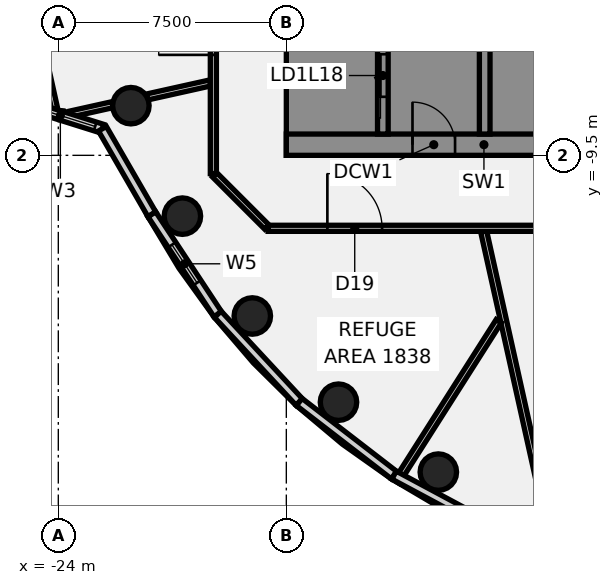
"""IFC4 building model, lengths in metres.
Left out: names, types, materials, properties, quantities, classifications, styles, units other than length and angle.
Written with IfcOpenShell. Run it as: python <this file> out.ifc"""

import sys

from ifc_helpers import new_model, si_unit, direction, frame, frame_2d, origin, origin_2d, place, context, subcontext, project, spatial, polyline, rectangle, circle, outline, extrude, element, fill, save


model = new_model("IFC4")
c1 = context("Model", 3, precision=1e-05, world=origin(), true_north=direction((0.0, 1.0)))
c2 = subcontext(c1, "Body", "Model", "MODEL_VIEW")
j1 = project(units=[si_unit("LENGTHUNIT", "METRE"), si_unit("PLANEANGLEUNIT", "RADIAN")], contexts=[c1])
p1 = place(None, origin())
s1 = spatial("IfcSite", under=j1, at=p1, CompositionType="ELEMENT")
p2 = place(p1, origin())
s2 = spatial("IfcBuilding", under=s1, at=p2, CompositionType="ELEMENT")
p3 = place(p2, frame((0.0, 0.0, 79.0)))
s3 = spatial("IfcBuildingStorey", under=s2, at=p3, CompositionType="ELEMENT", Elevation=79.0)
for number, where, z_axis, x_axis in (
    (1, (-21.613, -7.866, -0.18), (0.0, 0.0, 1.0), (1.0, 0.0, 0.0)),
    (2, (-19.919, -11.5, -0.18), (0.0, 0.0, 1.0), (1.0, 0.0, 0.0)),
    (3, (-17.619, -14.784, -0.18), (0.0, 0.0, 1.0), (1.0, 0.0, 0.0)),
    (4, (-14.784, -17.619, -0.18), (0.0, 0.0, 1.0), (1.0, 0.0, 0.0)),
    (5, (-11.5, -19.919, -0.18), (0.0, 0.0, 1.0), (1.0, 0.0, 0.0)),
):
    element("IfcColumn", number, at=place(p3, frame(where, z_axis=z_axis, x_axis=x_axis)), inside=s3, PredefinedType="COLUMN", context=c2, shape_type="SweptSolid", body=[
        extrude(circle(Radius=0.6, at=origin_2d()), origin(), (0.0, 0.0, 1.0), 4.54),
    ])
p4 = place(p3, frame((-27.164, 5.714, 0.0), z_axis=(0.0, 0.0, 1.0), x_axis=(0.217081624554, -0.976153455293, 0.0)))
e6 = element("IfcWall", 6, at=p4, inside=s3, PredefinedType="PARTITIONING", context=c2, shape_type="SweptSolid", body=[
    extrude(rectangle(XDim=14.022, YDim=0.2, at=frame_2d((7.011, 0.0))), origin(), (0.0, 0.0, 1.0), 3.66),
])
p5 = place(p4, frame((6.099, 0.0, 0.0)))
e7 = element("IfcOpeningElement", 7, at=p5, cuts=e6, PredefinedType="OPENING", context=c2, shape_type="SweptSolid", body=[
    extrude(rectangle(XDim=1.4, YDim=2.1, at=frame_2d((0.7, 1.05))), frame((0.0, 0.11, 0.0), z_axis=(0.0, -1.0, 0.0), x_axis=(1.0, 0.0, 0.0)), (0.0, 0.0, 1.0), 0.22),
])
p6 = place(p3, frame((-10.009, -12.002, 0.0), z_axis=(0.0, 0.0, 1.0), x_axis=(0.217240415782, -0.976118128994, 0.0)))
e8 = element("IfcWall", 8, at=p6, inside=s3, PredefinedType="PARTITIONING", context=c2, shape_type="SweptSolid", body=[
    extrude(rectangle(XDim=9.257, YDim=0.2, at=frame_2d((4.628, 0.0))), origin(), (0.0, 0.0, 1.0), 3.66),
])
p7 = place(p3, frame((-18.858, -10.142, 0.0), z_axis=(0.0, 0.0, 1.0), x_axis=(0.707106781187, -0.707106781187, 0.0)))
e9 = element("IfcWall", 9, at=p7, inside=s3, PredefinedType="PARTITIONING", context=c2, shape_type="SweptSolid", body=[
    extrude(rectangle(XDim=2.426, YDim=0.2, at=frame_2d((1.213, 0.0))), origin(), (0.0, 0.0, 1.0), 3.66),
])
p8 = place(p3, frame((-17.1, -11.9, 0.0), z_axis=(0.0, 0.0, 1.0), x_axis=(1.0, 0.0, 0.0)))
e10 = element("IfcWall", 10, at=p8, inside=s3, PredefinedType="PARTITIONING", context=c2, shape_type="SweptSolid", body=[
    extrude(rectangle(XDim=34.145, YDim=0.2, at=frame_2d((17.073, 0.0))), origin(), (0.0, 0.0, 1.0), 3.66),
])
p9 = place(p8, frame((13.921, 0.0, 0.0)))
e11 = element("IfcOpeningElement", 11, at=p9, cuts=e10, PredefinedType="OPENING", context=c2, shape_type="SweptSolid", body=[
    extrude(rectangle(XDim=1.8, YDim=2.1, at=frame_2d((0.9, 1.05))), frame((0.0, 0.11, 0.0), z_axis=(0.0, -1.0, 0.0), x_axis=(1.0, 0.0, 0.0)), (0.0, 0.0, 1.0), 0.22),
])
p10 = place(p8, frame((1.95, 0.0, 0.0)))
e12 = element("IfcOpeningElement", 12, at=p10, cuts=e10, PredefinedType="OPENING", context=c2, shape_type="SweptSolid", body=[
    extrude(rectangle(XDim=1.8, YDim=2.1, at=frame_2d((0.9, 1.05))), frame((0.0, 0.11, 0.0), z_axis=(0.0, -1.0, 0.0), x_axis=(1.0, 0.0, 0.0)), (0.0, 0.0, 1.0), 0.22),
])
p11 = place(p8, frame((27.44, 0.0, 0.0)))
e13 = element("IfcOpeningElement", 13, at=p11, cuts=e10, PredefinedType="OPENING", context=c2, shape_type="SweptSolid", body=[
    extrude(rectangle(XDim=1.8, YDim=2.1, at=frame_2d((0.9, 1.05))), frame((0.0, 0.11, 0.0), z_axis=(0.0, -1.0, 0.0), x_axis=(1.0, 0.0, 0.0)), (0.0, 0.0, 1.0), 0.22),
])
p12 = place(p3, frame((-23.592, -8.14, 0.0), z_axis=(0.0, 0.0, 1.0), x_axis=(0.976142259417, 0.217131963057, 0.0)))
e14 = element("IfcWall", 14, at=p12, inside=s3, PredefinedType="PARTITIONING", context=c2, shape_type="SweptSolid", body=[
    extrude(rectangle(XDim=1.411, YDim=0.2, at=frame_2d((0.706, 0.0))), origin(), (0.0, 0.0, 1.0), 3.66),
])
p13 = place(p3, frame((-21.08, -7.581, 0.0), z_axis=(0.0, 0.0, 1.0), x_axis=(0.97615465389, 0.217076234739, 0.0)))
e15 = element("IfcWall", 15, at=p13, inside=s3, PredefinedType="PARTITIONING", context=c2, shape_type="SweptSolid", body=[
    extrude(rectangle(XDim=2.128, YDim=0.2, at=frame_2d((1.064, 0.0))), origin(), (0.0, 0.0, 1.0), 3.66),
])
p14 = place(p3, frame((-12.872, -20.233, 0.0), z_axis=(0.0, 0.0, 1.0), x_axis=(0.536749284021, 0.843741788762, 0.0)))
e16 = element("IfcWall", 16, at=p14, inside=s3, PredefinedType="PARTITIONING", context=c2, shape_type="SweptSolid", body=[
    extrude(rectangle(XDim=6.259, YDim=0.2, at=frame_2d((3.129, 0.0))), origin(), (0.0, 0.0, 1.0), 3.66),
])
p15 = place(p3, frame((-18.9, -10.1, 0.0), z_axis=(0.0, 0.0, 1.0), x_axis=(0.0, 1.0, 0.0)))
e17 = element("IfcWall", 17, at=p15, inside=s3, PredefinedType="PARTITIONING", context=c2, shape_type="SweptSolid", body=[
    extrude(rectangle(XDim=20.2, YDim=0.2, at=frame_2d((10.1, 0.0))), origin(), (0.0, 0.0, 1.0), 3.66),
])
p16 = place(p15, frame((10.606, 0.0, 0.0)))
e18 = element("IfcOpeningElement", 18, at=p16, cuts=e17, PredefinedType="OPENING", context=c2, shape_type="SweptSolid", body=[
    extrude(rectangle(XDim=1.8, YDim=2.1, at=frame_2d((0.9, 1.05))), frame((0.0, 0.11, 0.0), z_axis=(0.0, -1.0, 0.0), x_axis=(1.0, 0.0, 0.0)), (0.0, 0.0, 1.0), 0.22),
])
p17 = place(p15, frame((3.904, 0.0, 0.0)))
e19 = element("IfcOpeningElement", 19, at=p17, cuts=e17, PredefinedType="OPENING", context=c2, shape_type="SweptSolid", body=[
    extrude(rectangle(XDim=1.8, YDim=2.1, at=frame_2d((0.9, 1.05))), frame((0.0, 0.11, 0.0), z_axis=(0.0, -1.0, 0.0), x_axis=(1.0, 0.0, 0.0)), (0.0, 0.0, 1.0), 0.22),
])
p18 = place(p3, frame((-25.268, -7.771, 0.0), z_axis=(0.0, 0.0, 1.0), x_axis=(0.954072095572, -0.299577096006, 0.0)))
e20 = element("IfcWall", 20, at=p18, inside=s3, PredefinedType="SOLIDWALL", context=c2, shape_type="SweptSolid", body=[
    extrude(rectangle(XDim=2.85, YDim=0.3, at=frame_2d((1.425, 0.0))), origin(), (0.0, 0.0, 1.0), 4.36),
])
p19 = place(p18, frame((0.2, 0.0, 1.4)))
e21 = element("IfcOpeningElement", 21, at=p19, cuts=e20, PredefinedType="OPENING", context=c2, shape_type="SweptSolid", body=[
    extrude(rectangle(XDim=2.4, YDim=2.1, at=frame_2d((1.2, 1.05))), frame((0.0, 0.16, 0.0), z_axis=(0.0, -1.0, 0.0), x_axis=(1.0, 0.0, 0.0)), (0.0, 0.0, 1.0), 0.32),
])
p20 = place(p3, frame((-22.549, -8.625, 0.0), z_axis=(0.0, 0.0, 1.0), x_axis=(0.500322641095, -0.86583904671, 0.0)))
e22 = element("IfcWall", 22, at=p20, inside=s3, PredefinedType="SOLIDWALL", context=c2, shape_type="SweptSolid", body=[
    extrude(rectangle(XDim=3.251, YDim=0.3, at=frame_2d((1.625, 0.0))), origin(), (0.0, 0.0, 1.0), 4.36),
])
p21 = place(p3, frame((-20.923, -11.439, 0.0), z_axis=(0.0, 0.0, 1.0), x_axis=(0.550573607302, -0.834786621205, 0.0)))
e23 = element("IfcWall", 23, at=p21, inside=s3, PredefinedType="SOLIDWALL", context=c2, shape_type="SweptSolid", body=[
    extrude(rectangle(XDim=3.938, YDim=0.3, at=frame_2d((1.969, 0.0))), origin(), (0.0, 0.0, 1.0), 4.36),
])
p22 = place(p21, frame((1.2, 0.0, 1.4)))
e24 = element("IfcOpeningElement", 24, at=p22, cuts=e23, PredefinedType="OPENING", context=c2, shape_type="SweptSolid", body=[
    extrude(rectangle(XDim=1.5, YDim=1.0, at=frame_2d((0.75, 0.5))), frame((0.0, 0.16, 0.0), z_axis=(0.0, -1.0, 0.0), x_axis=(1.0, 0.0, 0.0)), (0.0, 0.0, 1.0), 0.32),
])
p23 = place(p3, frame((-18.754, -14.727, 0.0), z_axis=(0.0, 0.0, 1.0), x_axis=(0.680429698926, -0.732813362883, 0.0)))
e25 = element("IfcWall", 25, at=p23, inside=s3, PredefinedType="SOLIDWALL", context=c2, shape_type="SweptSolid", body=[
    extrude(rectangle(XDim=3.938, YDim=0.3, at=frame_2d((1.969, 0.0))), origin(), (0.0, 0.0, 1.0), 4.36),
])
p24 = place(p3, frame((-16.075, -17.613, 0.0), z_axis=(0.0, 0.0, 1.0), x_axis=(0.79179596038, -0.610785688376, 0.0)))
e26 = element("IfcWall", 26, at=p24, inside=s3, PredefinedType="SOLIDWALL", context=c2, shape_type="SweptSolid", body=[
    extrude(rectangle(XDim=3.938, YDim=0.3, at=frame_2d((1.969, 0.0))), origin(), (0.0, 0.0, 1.0), 4.36),
])
p25 = place(p3, frame((-12.956, -20.019, 0.0), z_axis=(0.0, 0.0, 1.0), x_axis=(0.881521417359, -0.472144036007, 0.0)))
e27 = element("IfcWall", 27, at=p25, inside=s3, PredefinedType="SOLIDWALL", context=c2, shape_type="SweptSolid", body=[
    extrude(rectangle(XDim=3.94, YDim=0.3, at=frame_2d((1.97, 0.0))), origin(), (0.0, 0.0, 1.0), 4.36),
])
p26 = place(p3, frame((-16.5, -9.15, 0.0), z_axis=(0.0, 0.0, 1.0), x_axis=(1.0, 0.0, 0.0)))
e28 = element("IfcWall", 28, at=p26, inside=s3, PredefinedType="SHEAR", context=c2, shape_type="SweptSolid", body=[
    extrude(rectangle(XDim=13.0, YDim=0.7, at=frame_2d((6.5, 0.0))), origin(), (0.0, 0.0, 1.0), 4.36),
])
p27 = place(p26, frame((4.15, 0.0, 0.0)))
e29 = element("IfcOpeningElement", 29, at=p27, cuts=e28, PredefinedType="OPENING", context=c2, shape_type="SweptSolid", body=[
    extrude(rectangle(XDim=1.4, YDim=2.1, at=frame_2d((0.7, 1.05))), frame((0.0, 0.36, 0.0), z_axis=(0.0, -1.0, 0.0), x_axis=(1.0, 0.0, 0.0)), (0.0, 0.0, 1.0), 0.72),
])
p28 = place(p26, frame((10.125, 0.0, 0.0)))
e30 = element("IfcOpeningElement", 30, at=p28, cuts=e28, PredefinedType="OPENING", context=c2, shape_type="SweptSolid", body=[
    extrude(rectangle(XDim=1.4, YDim=2.1, at=frame_2d((0.7, 1.05))), frame((0.0, 0.36, 0.0), z_axis=(0.0, -1.0, 0.0), x_axis=(1.0, 0.0, 0.0)), (0.0, 0.0, 1.0), 0.72),
])
p29 = place(p3, origin())
e31 = element("IfcWall", 31, at=p29, inside=s3, PredefinedType="SHEAR", context=c2, shape_type="SweptSolid", body=[
    extrude(outline(polyline([(-13.5, -8.8), (-13.5, -8.125), (-15.8, -8.125), (-15.8, -5.625), (-13.5, -5.625), (-13.5, -5.375), (-15.8, -5.375), (-15.8, -2.875), (-13.5, -2.875), (-13.5, -2.625), (-15.8, -2.625), (-15.8, -0.125), (-13.5, -0.125), (-13.5, 0.125), (-15.8, 0.125), (-15.8, 2.625), (-13.5, 2.625), (-13.5, 2.875), (-15.8, 2.875), (-15.8, 5.375), (-13.5, 5.375), (-13.5, 5.625), (-15.8, 5.625), (-15.8, 8.125), (-13.5, 8.125), (-13.5, 8.8), (-15.8, 8.8), (-16.5, 8.8), (-16.5, -8.8), (-15.8, -8.8), (-13.5, -8.8)])), origin(), (0.0, 0.0, 1.0), 4.36),
])
p30 = place(p3, origin())
e32 = element("IfcWall", 32, at=p30, inside=s3, PredefinedType="SHEAR", context=c2, shape_type="SweptSolid", body=[
    extrude(outline(polyline([(-7.5, -8.125), (-9.55, -8.125), (-9.55, -5.625), (-9.8, -5.625), (-9.8, -8.125), (-9.8, -8.8), (-7.5, -8.8), (-7.5, -8.125)])), origin(), (0.0, 0.0, 1.0), 4.36),
])
p31 = place(p3, frame((-13.325, -8.8, 0.0), z_axis=(0.0, 0.0, 1.0), x_axis=(0.0, 1.0, 0.0)))
e33 = element("IfcWall", 33, at=p31, inside=s3, PredefinedType="SHEAR", context=c2, shape_type="SweptSolid", body=[
    extrude(rectangle(XDim=17.6, YDim=0.35, at=frame_2d((8.8, 0.0))), origin(), (0.0, 0.0, 1.0), 4.36),
])
p32 = place(p31, frame((1.225, 0.0, 0.0)))
e34 = element("IfcOpeningElement", 34, at=p32, cuts=e33, PredefinedType="OPENING", context=c2, shape_type="SweptSolid", body=[
    extrude(rectangle(XDim=1.4, YDim=2.1, at=frame_2d((0.7, 1.05))), frame((0.0, 0.185, 0.0), z_axis=(0.0, -1.0, 0.0), x_axis=(1.0, 0.0, 0.0)), (0.0, 0.0, 1.0), 0.37),
])
p33 = place(p31, frame((4.125, 0.0, 0.0)))
e35 = element("IfcOpeningElement", 35, at=p33, cuts=e33, PredefinedType="OPENING", context=c2, shape_type="SweptSolid", body=[
    extrude(rectangle(XDim=1.1, YDim=2.1, at=frame_2d((0.55, 1.05))), frame((0.0, 0.185, 0.0), z_axis=(0.0, -1.0, 0.0), x_axis=(1.0, 0.0, 0.0)), (0.0, 0.0, 1.0), 0.37),
])
p34 = place(p31, frame((6.875, 0.0, 0.0)))
e36 = element("IfcOpeningElement", 36, at=p34, cuts=e33, PredefinedType="OPENING", context=c2, shape_type="SweptSolid", body=[
    extrude(rectangle(XDim=1.1, YDim=2.1, at=frame_2d((0.55, 1.05))), frame((0.0, 0.185, 0.0), z_axis=(0.0, -1.0, 0.0), x_axis=(1.0, 0.0, 0.0)), (0.0, 0.0, 1.0), 0.37),
])
p35 = place(p31, frame((9.625, 0.0, 0.0)))
e37 = element("IfcOpeningElement", 37, at=p35, cuts=e33, PredefinedType="OPENING", context=c2, shape_type="SweptSolid", body=[
    extrude(rectangle(XDim=1.1, YDim=2.1, at=frame_2d((0.55, 1.05))), frame((0.0, 0.185, 0.0), z_axis=(0.0, -1.0, 0.0), x_axis=(1.0, 0.0, 0.0)), (0.0, 0.0, 1.0), 0.37),
])
p36 = place(p31, frame((12.375, 0.0, 0.0)))
e38 = element("IfcOpeningElement", 38, at=p36, cuts=e33, PredefinedType="OPENING", context=c2, shape_type="SweptSolid", body=[
    extrude(rectangle(XDim=1.1, YDim=2.1, at=frame_2d((0.55, 1.05))), frame((0.0, 0.185, 0.0), z_axis=(0.0, -1.0, 0.0), x_axis=(1.0, 0.0, 0.0)), (0.0, 0.0, 1.0), 0.37),
])
p37 = place(p3, frame((-9.975, -8.8, 0.0), z_axis=(0.0, 0.0, 1.0), x_axis=(0.0, 1.0, 0.0)))
e39 = element("IfcWall", 39, at=p37, inside=s3, PredefinedType="SHEAR", context=c2, shape_type="SweptSolid", body=[
    extrude(rectangle(XDim=17.6, YDim=0.35, at=frame_2d((8.8, 0.0))), origin(), (0.0, 0.0, 1.0), 4.36),
])
p38 = place(p10, frame((1.8, 0.0, 0.0), z_axis=(0.0, 0.0, 1.0), x_axis=(-1.0, 0.0, 0.0)))
e40 = element("IfcDoor", 40, at=p38, inside=s3, OperationType="DOUBLE_DOOR_SINGLE_SWING", PredefinedType="DOOR", context=c2, shape_type="SweptSolid", body=[
    extrude(rectangle(XDim=1.8, YDim=2.1, at=frame_2d((0.9, 1.05))), frame((0.0, 0.025, 0.0), z_axis=(0.0, -1.0, 0.0), x_axis=(1.0, 0.0, 0.0)), (0.0, 0.0, 1.0), 0.05),
])
fill(e12, e40)
p39 = place(p17, origin())
e41 = element("IfcDoor", 41, at=p39, inside=s3, OperationType="DOUBLE_DOOR_SINGLE_SWING", PredefinedType="DOOR", context=c2, shape_type="SweptSolid", body=[
    extrude(rectangle(XDim=1.8, YDim=2.1, at=frame_2d((0.9, 1.05))), frame((0.0, 0.025, 0.0), z_axis=(0.0, -1.0, 0.0), x_axis=(1.0, 0.0, 0.0)), (0.0, 0.0, 1.0), 0.05),
])
fill(e19, e41)
p40 = place(p19, origin())
e42 = element("IfcWindow", 42, at=p40, inside=s3, PartitioningType="SINGLE_PANEL", PredefinedType="WINDOW", context=c2, shape_type="SweptSolid", body=[
    extrude(rectangle(XDim=2.4, YDim=2.1, at=frame_2d((1.2, 1.05))), frame((0.0, 0.03, 0.0), z_axis=(0.0, -1.0, 0.0), x_axis=(1.0, 0.0, 0.0)), (0.0, 0.0, 1.0), 0.06),
])
fill(e21, e42)
p41 = place(p22, origin())
e43 = element("IfcWindow", 43, at=p41, inside=s3, PartitioningType="SINGLE_PANEL", PredefinedType="WINDOW", context=c2, shape_type="SweptSolid", body=[
    extrude(rectangle(XDim=1.5, YDim=1.0, at=frame_2d((0.75, 0.5))), frame((0.0, 0.03, 0.0), z_axis=(0.0, -1.0, 0.0), x_axis=(1.0, 0.0, 0.0)), (0.0, 0.0, 1.0), 0.06),
])
fill(e24, e43)
p42 = place(p27, origin())
e44 = element("IfcDoor", 44, at=p42, inside=s3, OperationType="SINGLE_SWING_LEFT", PredefinedType="DOOR", context=c2, shape_type="SweptSolid", body=[
    extrude(rectangle(XDim=1.4, YDim=2.1, at=frame_2d((0.7, 1.05))), frame((0.0, 0.025, 0.0), z_axis=(0.0, -1.0, 0.0), x_axis=(1.0, 0.0, 0.0)), (0.0, 0.0, 1.0), 0.05),
])
fill(e29, e44)
p43 = place(p32, origin())
e45 = element("IfcDoor", 45, at=p43, inside=s3, OperationType="SLIDING_TO_LEFT", PredefinedType="DOOR", context=c2, shape_type="SweptSolid", body=[
    extrude(rectangle(XDim=1.4, YDim=2.1, at=frame_2d((0.7, 1.05))), frame((0.0, 0.025, 0.0), z_axis=(0.0, -1.0, 0.0), x_axis=(1.0, 0.0, 0.0)), (0.0, 0.0, 1.0), 0.05),
])
fill(e34, e45)
save(model, sys.argv[1])
